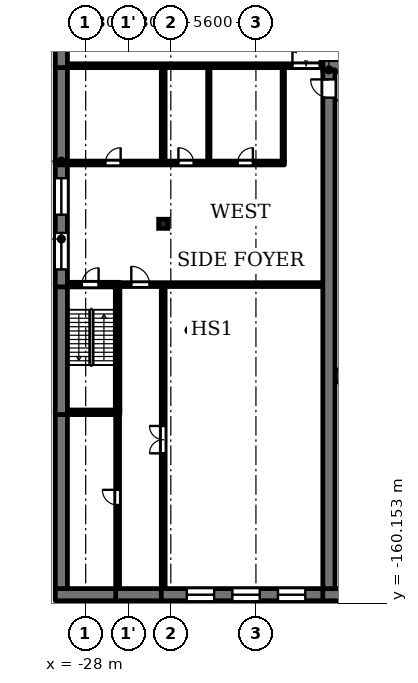
"""IFC4 building model, lengths in metres.
Left out: names, types, materials, properties, quantities, classifications, styles, units other than length and angle.
Written with IfcOpenShell. Run it as: python <this file> out.ifc"""

import sys

from ifc_helpers import new_model, si_unit, direction, frame, frame_2d, origin, origin_2d, place, context, subcontext, project, spatial, rectangle, extrude, element, fill, save


model = new_model("IFC4")
c1 = context("Model", 3, precision=1e-05, world=origin(), true_north=direction((0.0, 1.0)))
c2 = subcontext(c1, "Body", "Model", "MODEL_VIEW")
j1 = project(units=[si_unit("LENGTHUNIT", "METRE"), si_unit("PLANEANGLEUNIT", "RADIAN")], contexts=[c1])
p1 = place(None, origin())
s1 = spatial("IfcSite", under=j1, at=p1, CompositionType="ELEMENT")
p2 = place(p1, origin())
s2 = spatial("IfcBuilding", under=s1, at=p2, CompositionType="ELEMENT")
p3 = place(p2, frame((0.0, 0.0, 6.5)))
s3 = spatial("IfcBuildingStorey", under=s2, at=p3, CompositionType="ELEMENT", Elevation=6.5)
p4 = place(p3, frame((-22.9, -135.2, 0.0), z_axis=(0.0, 0.0, 1.0), x_axis=(1.0, 0.0, 0.0)))
e1 = element("IfcColumn", 1, at=p4, inside=s3, PredefinedType="COLUMN", context=c2, shape_type="SweptSolid", body=[
    extrude(rectangle(XDim=0.6, YDim=0.6, at=origin_2d()), origin(), (0.0, 0.0, 1.0), 4.45),
])
p5 = place(p3, frame((-30.0, -159.6, 0.0), z_axis=(0.0, 0.0, 1.0), x_axis=(1.0, 0.0, 0.0)))
e2 = element("IfcWall", 2, at=p5, inside=s3, PredefinedType="SOLIDWALL", context=c2, shape_type="SweptSolid", body=[
    extrude(rectangle(XDim=4.225, YDim=0.8, at=frame_2d((2.112, 0.0))), origin(), (0.0, 0.0, 1.0), 4.45),
])
p6 = place(p3, frame((-26.025, -159.6, 0.0), z_axis=(0.0, 0.0, 1.0), x_axis=(1.0, 0.0, 0.0)))
e3 = element("IfcWall", 3, at=p6, inside=s3, PredefinedType="SOLIDWALL", context=c2, shape_type="SweptSolid", body=[
    extrude(rectangle(XDim=3.25, YDim=0.8, at=frame_2d((1.625, 0.0))), origin(), (0.0, 0.0, 1.0), 4.45),
])
p7 = place(p3, frame((-23.025, -159.6, 0.0), z_axis=(0.0, 0.0, 1.0), x_axis=(1.0, 0.0, 0.0)))
e4 = element("IfcWall", 4, at=p7, inside=s3, PredefinedType="SOLIDWALL", context=c2, shape_type="SweptSolid", body=[
    extrude(rectangle(XDim=11.425, YDim=0.8, at=frame_2d((5.712, 0.0))), origin(), (0.0, 0.0, 1.0), 4.45),
])
p8 = place(p7, frame((1.675, 0.0, 0.9)))
e5 = element("IfcOpeningElement", 5, at=p8, cuts=e4, PredefinedType="OPENING", context=c2, shape_type="SweptSolid", body=[
    extrude(rectangle(XDim=1.8, YDim=1.5, at=frame_2d((0.9, 0.75))), frame((0.0, 0.41, 0.0), z_axis=(0.0, -1.0, 0.0), x_axis=(1.0, 0.0, 0.0)), (0.0, 0.0, 1.0), 0.82),
])
p9 = place(p7, frame((4.675, 0.0, 0.9)))
e6 = element("IfcOpeningElement", 6, at=p9, cuts=e4, PredefinedType="OPENING", context=c2, shape_type="SweptSolid", body=[
    extrude(rectangle(XDim=1.8, YDim=1.5, at=frame_2d((0.9, 0.75))), frame((0.0, 0.41, 0.0), z_axis=(0.0, -1.0, 0.0), x_axis=(1.0, 0.0, 0.0)), (0.0, 0.0, 1.0), 0.82),
])
p10 = place(p7, frame((7.675, 0.0, 0.9)))
e7 = element("IfcOpeningElement", 7, at=p10, cuts=e4, PredefinedType="OPENING", context=c2, shape_type="SweptSolid", body=[
    extrude(rectangle(XDim=1.8, YDim=1.5, at=frame_2d((0.9, 0.75))), frame((0.0, 0.41, 0.0), z_axis=(0.0, -1.0, 0.0), x_axis=(1.0, 0.0, 0.0)), (0.0, 0.0, 1.0), 0.82),
])
p11 = place(p3, frame((-12.4, -159.6, 0.0), z_axis=(0.0, 0.0, 1.0), x_axis=(1.0, 0.0, 0.0)))
e8 = element("IfcWall", 8, at=p11, inside=s3, PredefinedType="SOLIDWALL", context=c2, shape_type="SweptSolid", body=[
    extrude(rectangle(XDim=24.8, YDim=0.8, at=frame_2d((12.4, 0.0))), origin(), (0.0, 0.0, 1.0), 4.8),
])
p12 = place(p3, frame((-29.2, -147.6, 0.0), z_axis=(0.0, 0.0, 1.0), x_axis=(1.0, 0.0, 0.0)))
e9 = element("IfcWall", 9, at=p12, inside=s3, PredefinedType="SOLIDWALL", context=c2, shape_type="SweptSolid", body=[
    extrude(rectangle(XDim=3.45, YDim=0.3, at=frame_2d((1.725, 0.0))), origin(), (0.0, 0.0, 1.0), 4.45),
])
p13 = place(p3, frame((-11.6, -145.2, 0.0), z_axis=(0.0, 0.0, 1.0), x_axis=(1.0, 0.0, 0.0)))
e10 = element("IfcWall", 10, at=p13, inside=s3, PredefinedType="SOLIDWALL", context=c2, shape_type="SweptSolid", body=[
    extrude(rectangle(XDim=4.6, YDim=0.8, at=frame_2d((2.3, 0.0))), origin(), (0.0, 0.0, 1.0), 4.8),
])
p14 = place(p3, frame((-29.2, -139.2, 0.0), z_axis=(0.0, 0.0, 1.0), x_axis=(1.0, 0.0, 0.0)))
e11 = element("IfcWall", 11, at=p14, inside=s3, PredefinedType="SOLIDWALL", context=c2, shape_type="SweptSolid", body=[
    extrude(rectangle(XDim=3.45, YDim=0.3, at=frame_2d((1.725, 0.0))), origin(), (0.0, 0.0, 1.0), 4.45),
])
p15 = place(p14, frame((0.95, 0.0, 0.0)))
e12 = element("IfcOpeningElement", 12, at=p15, cuts=e11, PredefinedType="OPENING", context=c2, shape_type="SweptSolid", body=[
    extrude(rectangle(XDim=1.1, YDim=2.1, at=frame_2d((0.55, 1.05))), frame((0.0, 0.16, 0.0), z_axis=(0.0, -1.0, 0.0), x_axis=(1.0, 0.0, 0.0)), (0.0, 0.0, 1.0), 0.32),
])
p16 = place(p3, frame((-25.75, -139.2, 0.0), z_axis=(0.0, 0.0, 1.0), x_axis=(1.0, 0.0, 0.0)))
e13 = element("IfcWall", 13, at=p16, inside=s3, PredefinedType="SOLIDWALL", context=c2, shape_type="SweptSolid", body=[
    extrude(rectangle(XDim=13.35, YDim=0.25, at=frame_2d((6.675, 0.0))), origin(), (0.0, 0.0, 1.0), 4.45),
])
p17 = place(p16, frame((0.75, 0.0, 0.0)))
e14 = element("IfcOpeningElement", 14, at=p17, cuts=e13, PredefinedType="OPENING", context=c2, shape_type="SweptSolid", body=[
    extrude(rectangle(XDim=1.2, YDim=2.1, at=frame_2d((0.6, 1.05))), frame((0.0, 0.135, 0.0), z_axis=(0.0, -1.0, 0.0), x_axis=(1.0, 0.0, 0.0)), (0.0, 0.0, 1.0), 0.27),
])
p18 = place(p3, frame((-29.2, -131.2, 0.0), z_axis=(0.0, 0.0, 1.0), x_axis=(1.0, 0.0, 0.0)))
e15 = element("IfcWall", 15, at=p18, inside=s3, PredefinedType="SOLIDWALL", context=c2, shape_type="SweptSolid", body=[
    extrude(rectangle(XDim=14.275, YDim=0.25, at=frame_2d((7.137, 0.0))), origin(), (0.0, 0.0, 1.0), 4.45),
])
p19 = place(p18, frame((2.5, 0.0, 0.0)))
e16 = element("IfcOpeningElement", 16, at=p19, cuts=e15, PredefinedType="OPENING", context=c2, shape_type="SweptSolid", body=[
    extrude(rectangle(XDim=1.0, YDim=2.1, at=frame_2d((0.5, 1.05))), frame((0.0, 0.135, 0.0), z_axis=(0.0, -1.0, 0.0), x_axis=(1.0, 0.0, 0.0)), (0.0, 0.0, 1.0), 0.27),
])
p20 = place(p18, frame((7.3, 0.0, 0.0)))
e17 = element("IfcOpeningElement", 17, at=p20, cuts=e15, PredefinedType="OPENING", context=c2, shape_type="SweptSolid", body=[
    extrude(rectangle(XDim=1.0, YDim=2.1, at=frame_2d((0.5, 1.05))), frame((0.0, 0.135, 0.0), z_axis=(0.0, -1.0, 0.0), x_axis=(1.0, 0.0, 0.0)), (0.0, 0.0, 1.0), 0.27),
])
p21 = place(p18, frame((11.2, 0.0, 0.0)))
e18 = element("IfcOpeningElement", 18, at=p21, cuts=e15, PredefinedType="OPENING", context=c2, shape_type="SweptSolid", body=[
    extrude(rectangle(XDim=1.0, YDim=2.1, at=frame_2d((0.5, 1.05))), frame((0.0, 0.135, 0.0), z_axis=(0.0, -1.0, 0.0), x_axis=(1.0, 0.0, 0.0)), (0.0, 0.0, 1.0), 0.27),
])
p22 = place(p3, frame((-29.2, -124.8, 0.0), z_axis=(0.0, 0.0, 1.0), x_axis=(1.0, 0.0, 0.0)))
e19 = element("IfcWall", 19, at=p22, inside=s3, PredefinedType="SOLIDWALL", context=c2, shape_type="SweptSolid", body=[
    extrude(rectangle(XDim=16.8, YDim=0.25, at=frame_2d((8.4, 0.0))), origin(), (0.0, 0.0, 1.0), 4.45),
])
p23 = place(p22, frame((14.8, 0.0, 0.0)))
e20 = element("IfcOpeningElement", 20, at=p23, cuts=e19, PredefinedType="OPENING", context=c2, shape_type="SweptSolid", body=[
    extrude(rectangle(XDim=1.8, YDim=2.1, at=frame_2d((0.9, 1.05))), frame((0.0, 0.135, 0.0), z_axis=(0.0, -1.0, 0.0), x_axis=(1.0, 0.0, 0.0)), (0.0, 0.0, 1.0), 0.27),
])
p24 = place(p3, frame((-12.4, -124.8, 0.0), z_axis=(0.0, 0.0, 1.0), x_axis=(1.0, 0.0, 0.0)))
e21 = element("IfcWall", 21, at=p24, inside=s3, PredefinedType="SOLIDWALL", context=c2, shape_type="SweptSolid", body=[
    extrude(rectangle(XDim=24.8, YDim=0.8, at=frame_2d((12.4, 0.0))), origin(), (0.0, 0.0, 1.0), 4.8),
])
p25 = place(p24, frame((5.5, 0.0, 0.0)))
e22 = element("IfcOpeningElement", 22, at=p25, cuts=e21, PredefinedType="OPENING", context=c2, shape_type="SweptSolid", body=[
    extrude(rectangle(XDim=1.8, YDim=2.2, at=frame_2d((0.9, 1.1))), frame((0.0, 0.41, 0.0), z_axis=(0.0, -1.0, 0.0), x_axis=(1.0, 0.0, 0.0)), (0.0, 0.0, 1.0), 0.82),
])
p26 = place(p24, frame((17.5, 0.0, 0.0)))
e23 = element("IfcOpeningElement", 23, at=p26, cuts=e21, PredefinedType="OPENING", context=c2, shape_type="SweptSolid", body=[
    extrude(rectangle(XDim=1.8, YDim=2.2, at=frame_2d((0.9, 1.1))), frame((0.0, 0.41, 0.0), z_axis=(0.0, -1.0, 0.0), x_axis=(1.0, 0.0, 0.0)), (0.0, 0.0, 1.0), 0.82),
])
p27 = place(p3, frame((-29.6, -159.2, 0.0), z_axis=(0.0, 0.0, 1.0), x_axis=(0.0, 1.0, 0.0)))
e24 = element("IfcWall", 24, at=p27, inside=s3, PredefinedType="SOLIDWALL", context=c2, shape_type="SweptSolid", body=[
    extrude(rectangle(XDim=11.75, YDim=0.8, at=frame_2d((5.875, 0.0))), origin(), (0.0, 0.0, 1.0), 4.45),
])
p28 = place(p3, frame((-29.6, -147.75, 0.0), z_axis=(0.0, 0.0, 1.0), x_axis=(0.0, 1.0, 0.0)))
e25 = element("IfcWall", 25, at=p28, inside=s3, PredefinedType="SOLIDWALL", context=c2, shape_type="SweptSolid", body=[
    extrude(rectangle(XDim=8.7, YDim=0.8, at=frame_2d((4.35, 0.0))), origin(), (0.0, 0.0, 1.0), 4.45),
])
p29 = place(p3, frame((-29.6, -139.35, 0.0), z_axis=(0.0, 0.0, 1.0), x_axis=(0.0, 1.0, 0.0)))
e26 = element("IfcWall", 26, at=p29, inside=s3, PredefinedType="SOLIDWALL", context=c2, shape_type="SweptSolid", body=[
    extrude(rectangle(XDim=8.275, YDim=0.8, at=frame_2d((4.137, 0.0))), origin(), (0.0, 0.0, 1.0), 4.45),
])
p30 = place(p29, frame((1.15, 0.0, 0.6)))
e27 = element("IfcOpeningElement", 27, at=p30, cuts=e26, PredefinedType="OPENING", context=c2, shape_type="SweptSolid", body=[
    extrude(rectangle(XDim=2.4, YDim=3.2, at=frame_2d((1.2, 1.6))), frame((0.0, 0.41, 0.0), z_axis=(0.0, -1.0, 0.0), x_axis=(1.0, 0.0, 0.0)), (0.0, 0.0, 1.0), 0.82),
])
p31 = place(p29, frame((4.75, 0.0, 0.6)))
e28 = element("IfcOpeningElement", 28, at=p31, cuts=e26, PredefinedType="OPENING", context=c2, shape_type="SweptSolid", body=[
    extrude(rectangle(XDim=2.4, YDim=3.2, at=frame_2d((1.2, 1.6))), frame((0.0, 0.41, 0.0), z_axis=(0.0, -1.0, 0.0), x_axis=(1.0, 0.0, 0.0)), (0.0, 0.0, 1.0), 0.82),
])
p32 = place(p3, frame((-29.6, -131.325, 0.0), z_axis=(0.0, 0.0, 1.0), x_axis=(0.0, 1.0, 0.0)))
e29 = element("IfcWall", 29, at=p32, inside=s3, PredefinedType="SOLIDWALL", context=c2, shape_type="SweptSolid", body=[
    extrude(rectangle(XDim=6.65, YDim=0.8, at=frame_2d((3.325, 0.0))), origin(), (0.0, 0.0, 1.0), 4.45),
])
p33 = place(p3, frame((-29.6, -124.925, 0.0), z_axis=(0.0, 0.0, 1.0), x_axis=(0.0, 1.0, 0.0)))
e30 = element("IfcWall", 30, at=p33, inside=s3, PredefinedType="SOLIDWALL", context=c2, shape_type="SweptSolid", body=[
    extrude(rectangle(XDim=3.875, YDim=0.8, at=frame_2d((1.938, 0.0))), origin(), (0.0, 0.0, 1.0), 4.45),
])
p34 = place(p3, frame((-25.9, -159.2, 0.0), z_axis=(0.0, 0.0, 1.0), x_axis=(0.0, 1.0, 0.0)))
e31 = element("IfcWall", 31, at=p34, inside=s3, PredefinedType="SOLIDWALL", context=c2, shape_type="SweptSolid", body=[
    extrude(rectangle(XDim=11.45, YDim=0.25, at=frame_2d((5.725, 0.0))), origin(), (0.0, 0.0, 1.0), 4.45),
])
p35 = place(p34, frame((5.5, 0.0, 0.0)))
e32 = element("IfcOpeningElement", 32, at=p35, cuts=e31, PredefinedType="OPENING", context=c2, shape_type="SweptSolid", body=[
    extrude(rectangle(XDim=1.0, YDim=2.1, at=frame_2d((0.5, 1.05))), frame((0.0, 0.135, 0.0), z_axis=(0.0, -1.0, 0.0), x_axis=(1.0, 0.0, 0.0)), (0.0, 0.0, 1.0), 0.27),
])
p36 = place(p3, frame((-25.9, -147.45, 0.0), z_axis=(0.0, 0.0, 1.0), x_axis=(0.0, 1.0, 0.0)))
e33 = element("IfcWall", 33, at=p36, inside=s3, PredefinedType="SOLIDWALL", context=c2, shape_type="SweptSolid", body=[
    extrude(rectangle(XDim=8.225, YDim=0.3, at=frame_2d((4.112, 0.0))), origin(), (0.0, 0.0, 1.0), 4.45),
])
p37 = place(p3, frame((-22.9, -159.2, 0.0), z_axis=(0.0, 0.0, 1.0), x_axis=(0.0, 1.0, 0.0)))
e34 = element("IfcWall", 34, at=p37, inside=s3, PredefinedType="SOLIDWALL", context=c2, shape_type="SweptSolid", body=[
    extrude(rectangle(XDim=19.875, YDim=0.25, at=frame_2d((9.938, 0.0))), origin(), (0.0, 0.0, 1.0), 4.45),
])
p38 = place(p37, frame((8.9, 0.0, 0.0)))
e35 = element("IfcOpeningElement", 35, at=p38, cuts=e34, PredefinedType="OPENING", context=c2, shape_type="SweptSolid", body=[
    extrude(rectangle(XDim=1.8, YDim=2.1, at=frame_2d((0.9, 1.05))), frame((0.0, 0.135, 0.0), z_axis=(0.0, -1.0, 0.0), x_axis=(1.0, 0.0, 0.0)), (0.0, 0.0, 1.0), 0.27),
])
p39 = place(p3, frame((-22.9, -131.075, 0.0), z_axis=(0.0, 0.0, 1.0), x_axis=(0.0, 1.0, 0.0)))
e36 = element("IfcWall", 36, at=p39, inside=s3, PredefinedType="SOLIDWALL", context=c2, shape_type="SweptSolid", body=[
    extrude(rectangle(XDim=6.15, YDim=0.25, at=frame_2d((3.075, 0.0))), origin(), (0.0, 0.0, 1.0), 4.45),
])
for number, where, z_axis, x_axis in (
    (37, (-19.9, -131.075, 0.0), (0.0, 0.0, 1.0), (0.0, 1.0, 0.0)),
    (38, (-15.0, -131.075, 0.0), (0.0, 0.0, 1.0), (0.0, 1.0, 0.0)),
):
    element("IfcWall", number, at=place(p3, frame(where, z_axis=z_axis, x_axis=x_axis)), inside=s3, PredefinedType="PARTITIONING", context=c2, shape_type="SweptSolid", body=[
        extrude(rectangle(XDim=6.15, YDim=0.15, at=frame_2d((3.075, 0.0))), origin(), (0.0, 0.0, 1.0), 4.45),
    ])
p40 = place(p3, frame((-12.0, -159.2, 0.0), z_axis=(0.0, 0.0, 1.0), x_axis=(0.0, 1.0, 0.0)))
e39 = element("IfcWall", 39, at=p40, inside=s3, PredefinedType="SOLIDWALL", context=c2, shape_type="SweptSolid", body=[
    extrude(rectangle(XDim=34.125, YDim=0.8, at=frame_2d((17.062, 0.0))), origin(), (0.0, 0.0, 1.0), 4.8),
])
p41 = place(p40, frame((32.3, 0.0, 0.0)))
e40 = element("IfcOpeningElement", 40, at=p41, cuts=e39, PredefinedType="OPENING", context=c2, shape_type="SweptSolid", body=[
    extrude(rectangle(XDim=1.2, YDim=2.1, at=frame_2d((0.6, 1.05))), frame((0.0, 0.41, 0.0), z_axis=(0.0, -1.0, 0.0), x_axis=(1.0, 0.0, 0.0)), (0.0, 0.0, 1.0), 0.82),
])
p42 = place(p30, origin())
e41 = element("IfcWindow", 41, at=p42, inside=s3, PartitioningType="SINGLE_PANEL", PredefinedType="WINDOW", context=c2, shape_type="SweptSolid", body=[
    extrude(rectangle(XDim=2.4, YDim=3.2, at=frame_2d((1.2, 1.6))), frame((0.0, 0.03, 0.0), z_axis=(0.0, -1.0, 0.0), x_axis=(1.0, 0.0, 0.0)), (0.0, 0.0, 1.0), 0.06),
])
fill(e27, e41)
p43 = place(p31, origin())
e42 = element("IfcWindow", 42, at=p43, inside=s3, PartitioningType="SINGLE_PANEL", PredefinedType="WINDOW", context=c2, shape_type="SweptSolid", body=[
    extrude(rectangle(XDim=2.4, YDim=3.2, at=frame_2d((1.2, 1.6))), frame((0.0, 0.03, 0.0), z_axis=(0.0, -1.0, 0.0), x_axis=(1.0, 0.0, 0.0)), (0.0, 0.0, 1.0), 0.06),
])
fill(e28, e42)
p44 = place(p8, origin())
e43 = element("IfcWindow", 43, at=p44, inside=s3, PartitioningType="SINGLE_PANEL", PredefinedType="WINDOW", context=c2, shape_type="SweptSolid", body=[
    extrude(rectangle(XDim=1.8, YDim=1.5, at=frame_2d((0.9, 0.75))), frame((0.0, 0.03, 0.0), z_axis=(0.0, -1.0, 0.0), x_axis=(1.0, 0.0, 0.0)), (0.0, 0.0, 1.0), 0.06),
])
fill(e5, e43)
p45 = place(p9, origin())
e44 = element("IfcWindow", 44, at=p45, inside=s3, PartitioningType="SINGLE_PANEL", PredefinedType="WINDOW", context=c2, shape_type="SweptSolid", body=[
    extrude(rectangle(XDim=1.8, YDim=1.5, at=frame_2d((0.9, 0.75))), frame((0.0, 0.03, 0.0), z_axis=(0.0, -1.0, 0.0), x_axis=(1.0, 0.0, 0.0)), (0.0, 0.0, 1.0), 0.06),
])
fill(e6, e44)
p46 = place(p10, origin())
e45 = element("IfcWindow", 45, at=p46, inside=s3, PartitioningType="SINGLE_PANEL", PredefinedType="WINDOW", context=c2, shape_type="SweptSolid", body=[
    extrude(rectangle(XDim=1.8, YDim=1.5, at=frame_2d((0.9, 0.75))), frame((0.0, 0.03, 0.0), z_axis=(0.0, -1.0, 0.0), x_axis=(1.0, 0.0, 0.0)), (0.0, 0.0, 1.0), 0.06),
])
fill(e7, e45)
p47 = place(p15, origin())
e46 = element("IfcDoor", 46, at=p47, inside=s3, OperationType="SINGLE_SWING_RIGHT", PredefinedType="DOOR", context=c2, shape_type="SweptSolid", body=[
    extrude(rectangle(XDim=1.1, YDim=2.1, at=frame_2d((0.55, 1.05))), frame((0.0, 0.025, 0.0), z_axis=(0.0, -1.0, 0.0), x_axis=(1.0, 0.0, 0.0)), (0.0, 0.0, 1.0), 0.05),
])
fill(e12, e46)
p48 = place(p41, origin())
e47 = element("IfcDoor", 47, at=p48, inside=s3, OperationType="SINGLE_SWING_RIGHT", PredefinedType="DOOR", context=c2, shape_type="SweptSolid", body=[
    extrude(rectangle(XDim=1.2, YDim=2.1, at=frame_2d((0.6, 1.05))), frame((0.0, 0.025, 0.0), z_axis=(0.0, -1.0, 0.0), x_axis=(1.0, 0.0, 0.0)), (0.0, 0.0, 1.0), 0.05),
])
fill(e40, e47)
p49 = place(p23, origin())
e48 = element("IfcDoor", 48, at=p49, inside=s3, OperationType="DOUBLE_DOOR_SINGLE_SWING", PredefinedType="DOOR", context=c2, shape_type="SweptSolid", body=[
    extrude(rectangle(XDim=1.8, YDim=2.1, at=frame_2d((0.9, 1.05))), frame((0.0, 0.025, 0.0), z_axis=(0.0, -1.0, 0.0), x_axis=(1.0, 0.0, 0.0)), (0.0, 0.0, 1.0), 0.05),
])
fill(e20, e48)
p50 = place(p19, origin())
e49 = element("IfcDoor", 49, at=p50, inside=s3, OperationType="SINGLE_SWING_RIGHT", PredefinedType="DOOR", context=c2, shape_type="SweptSolid", body=[
    extrude(rectangle(XDim=1.0, YDim=2.1, at=frame_2d((0.5, 1.05))), frame((0.0, 0.025, 0.0), z_axis=(0.0, -1.0, 0.0), x_axis=(1.0, 0.0, 0.0)), (0.0, 0.0, 1.0), 0.05),
])
fill(e16, e49)
p51 = place(p20, origin())
e50 = element("IfcDoor", 50, at=p51, inside=s3, OperationType="SINGLE_SWING_LEFT", PredefinedType="DOOR", context=c2, shape_type="SweptSolid", body=[
    extrude(rectangle(XDim=1.0, YDim=2.1, at=frame_2d((0.5, 1.05))), frame((0.0, 0.025, 0.0), z_axis=(0.0, -1.0, 0.0), x_axis=(1.0, 0.0, 0.0)), (0.0, 0.0, 1.0), 0.05),
])
fill(e17, e50)
p52 = place(p21, origin())
e51 = element("IfcDoor", 51, at=p52, inside=s3, OperationType="SINGLE_SWING_RIGHT", PredefinedType="DOOR", context=c2, shape_type="SweptSolid", body=[
    extrude(rectangle(XDim=1.0, YDim=2.1, at=frame_2d((0.5, 1.05))), frame((0.0, 0.025, 0.0), z_axis=(0.0, -1.0, 0.0), x_axis=(1.0, 0.0, 0.0)), (0.0, 0.0, 1.0), 0.05),
])
fill(e18, e51)
p53 = place(p17, origin())
e52 = element("IfcDoor", 52, at=p53, inside=s3, OperationType="SINGLE_SWING_LEFT", PredefinedType="DOOR", context=c2, shape_type="SweptSolid", body=[
    extrude(rectangle(XDim=1.2, YDim=2.1, at=frame_2d((0.6, 1.05))), frame((0.0, 0.025, 0.0), z_axis=(0.0, -1.0, 0.0), x_axis=(1.0, 0.0, 0.0)), (0.0, 0.0, 1.0), 0.05),
])
fill(e14, e52)
p54 = place(p38, origin())
e53 = element("IfcDoor", 53, at=p54, inside=s3, OperationType="DOUBLE_DOOR_SINGLE_SWING", PredefinedType="DOOR", context=c2, shape_type="SweptSolid", body=[
    extrude(rectangle(XDim=1.8, YDim=2.1, at=frame_2d((0.9, 1.05))), frame((0.0, 0.025, 0.0), z_axis=(0.0, -1.0, 0.0), x_axis=(1.0, 0.0, 0.0)), (0.0, 0.0, 1.0), 0.05),
])
fill(e35, e53)
p55 = place(p35, origin())
e54 = element("IfcDoor", 54, at=p55, inside=s3, OperationType="SINGLE_SWING_RIGHT", PredefinedType="DOOR", context=c2, shape_type="SweptSolid", body=[
    extrude(rectangle(XDim=1.0, YDim=2.1, at=frame_2d((0.5, 1.05))), frame((0.0, 0.025, 0.0), z_axis=(0.0, -1.0, 0.0), x_axis=(1.0, 0.0, 0.0)), (0.0, 0.0, 1.0), 0.05),
])
fill(e32, e54)
save(model, sys.argv[1])
